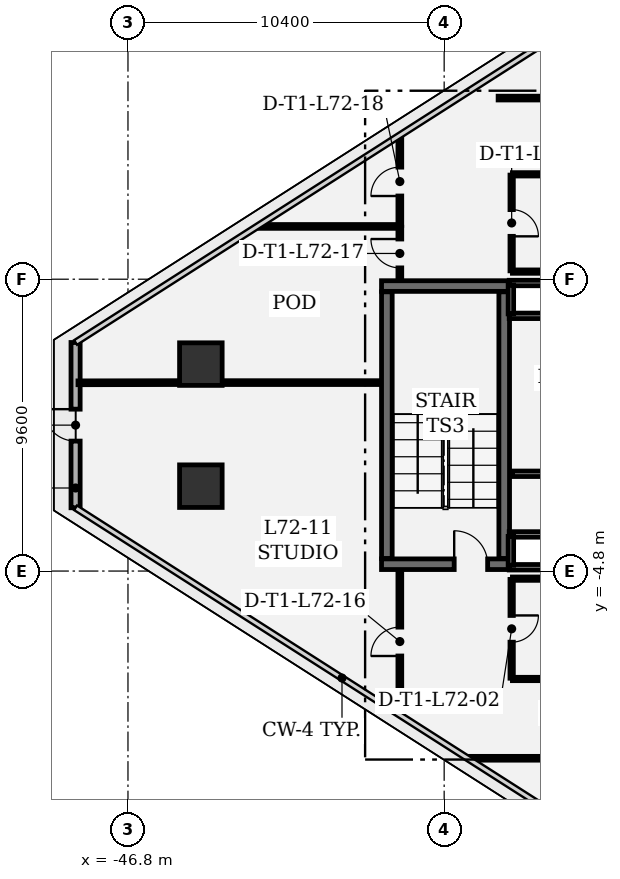
"""IFC4 building model, lengths in metres.
Left out: names, types, materials, properties, quantities, classifications, styles, units other than length and angle.
Written with IfcOpenShell. Run it as: python <this file> out.ifc"""

import sys

from ifc_helpers import new_model, si_unit, direction, frame, frame_2d, origin, origin_2d, place, context, subcontext, project, spatial, rectangle, extrude, element, fill, save


model = new_model("IFC4")
c1 = context("Model", 3, precision=1e-05, world=origin(), true_north=direction((0.0, 1.0)))
c2 = subcontext(c1, "Body", "Model", "MODEL_VIEW")
j1 = project(units=[si_unit("LENGTHUNIT", "METRE"), si_unit("PLANEANGLEUNIT", "RADIAN")], contexts=[c1])
p1 = place(None, origin())
s1 = spatial("IfcSite", under=j1, at=p1, CompositionType="ELEMENT")
p2 = place(p1, origin())
s2 = spatial("IfcBuilding", under=s1, at=p2, CompositionType="ELEMENT")
p3 = place(p2, frame((0.0, 0.0, 310.2)))
s3 = spatial("IfcBuildingStorey", under=s2, at=p3, CompositionType="ELEMENT", Elevation=310.2)
for number, where, z_axis, x_axis in (
    (1, (-44.403, 2.008, 0.0), (0.0, 0.0, 1.0), (1.0, 0.0, 0.0)),
    (2, (-44.403, -2.008, 0.0), (0.0, 0.0, 1.0), (1.0, 0.0, 0.0)),
):
    element("IfcColumn", number, at=place(p3, frame(where, z_axis=z_axis, x_axis=x_axis)), inside=s3, PredefinedType="COLUMN", context=c2, shape_type="SweptSolid", body=[
        extrude(rectangle(XDim=1.4, YDim=1.4, at=origin_2d()), origin(), (0.0, 0.0, 1.0), 4.2),
    ])
p4 = place(p3, frame((-48.523, -2.718, 0.0), z_axis=(0.0, 0.0, 1.0), x_axis=(0.0, 1.0, 0.0)))
e3 = element("IfcWall", 3, at=p4, inside=s3, PredefinedType="SOLIDWALL", context=c2, shape_type="SweptSolid", body=[
    extrude(rectangle(XDim=5.437, YDim=0.3, at=frame_2d((2.718, 0.0))), origin(), (0.0, 0.0, 1.0), 3.91),
])
p5 = place(p4, frame((2.193, 0.0, 0.0)))
e4 = element("IfcOpeningElement", 4, at=p5, cuts=e3, PredefinedType="OPENING", context=c2, shape_type="SweptSolid", body=[
    extrude(rectangle(XDim=1.05, YDim=2.2, at=frame_2d((0.525, 1.1))), frame((0.0, 0.16, 0.0), z_axis=(0.0, -1.0, 0.0), x_axis=(1.0, 0.0, 0.0)), (0.0, 0.0, 1.0), 0.32),
])
p6 = place(p3, frame((-38.46, -4.575, 0.0), z_axis=(0.0, 0.0, 1.0), x_axis=(1.0, 0.0, 0.0)))
e5 = element("IfcWall", 5, at=p6, inside=s3, PredefinedType="SHEAR", context=c2, shape_type="SweptSolid", body=[
    extrude(rectangle(XDim=4.21, YDim=0.35, at=frame_2d((2.105, 0.0))), origin(), (0.0, 0.0, 1.0), 3.91),
])
p7 = place(p6, frame((2.39, 0.0, 0.0)))
e6 = element("IfcOpeningElement", 6, at=p7, cuts=e5, PredefinedType="OPENING", context=c2, shape_type="SweptSolid", body=[
    extrude(rectangle(XDim=1.1, YDim=2.2, at=frame_2d((0.55, 1.1))), frame((0.0, 0.185, 0.0), z_axis=(0.0, -1.0, 0.0), x_axis=(1.0, 0.0, 0.0)), (0.0, 0.0, 1.0), 0.37),
])
p8 = place(p3, frame((-34.25, 4.575, 0.0), z_axis=(0.0, 0.0, 1.0), x_axis=(-1.0, 0.0, 0.0)))
e7 = element("IfcWall", 7, at=p8, inside=s3, PredefinedType="SHEAR", context=c2, shape_type="SweptSolid", body=[
    extrude(rectangle(XDim=4.21, YDim=0.35, at=frame_2d((2.105, 0.0))), origin(), (0.0, 0.0, 1.0), 3.91),
])
for number, where, z_axis, x_axis in (
    (8, (-34.425, -4.385, 0.0), (0.0, 0.0, 1.0), (0.0, 1.0, 0.0)),
    (9, (-38.285, 4.385, 0.0), (0.0, 0.0, 1.0), (0.0, -1.0, 0.0)),
):
    element("IfcWall", number, at=place(p3, frame(where, z_axis=z_axis, x_axis=x_axis)), inside=s3, PredefinedType="SHEAR", context=c2, shape_type="SweptSolid", body=[
        extrude(rectangle(XDim=8.77, YDim=0.35, at=frame_2d((4.385, 0.0))), origin(), (0.0, 0.0, 1.0), 3.91),
    ])
for number, where, z_axis, x_axis in (
    (10, (-32.99, 3.595, 0.0), (0.0, 0.0, 1.0), (-1.0, 0.0, 0.0)),
    (11, (-34.26, 4.675, 0.0), (0.0, 0.0, 1.0), (1.0, 0.0, 0.0)),
):
    element("IfcWall", number, at=place(p3, frame(where, z_axis=z_axis, x_axis=x_axis)), inside=s3, PredefinedType="PARTITIONING", context=c2, shape_type="SweptSolid", body=[
        extrude(rectangle(XDim=1.27, YDim=0.18, at=frame_2d((0.635, 0.0))), origin(), (0.0, 0.0, 1.0), 3.91),
    ])
p9 = place(p3, frame((-34.205, 3.66, 0.0), z_axis=(0.0, 0.0, 1.0), x_axis=(0.0, 1.0, 0.0)))
e12 = element("IfcWall", 12, at=p9, inside=s3, PredefinedType="PARTITIONING", context=c2, shape_type="SweptSolid", body=[
    extrude(rectangle(XDim=0.95, YDim=0.18, at=frame_2d((0.475, 0.0))), origin(), (0.0, 0.0, 1.0), 3.91),
])
for number, where, z_axis, x_axis in (
    (13, (-32.99, -4.675, 0.0), (0.0, 0.0, 1.0), (-1.0, 0.0, 0.0)),
    (14, (-34.26, -3.595, 0.0), (0.0, 0.0, 1.0), (1.0, 0.0, 0.0)),
):
    element("IfcWall", number, at=place(p3, frame(where, z_axis=z_axis, x_axis=x_axis)), inside=s3, PredefinedType="PARTITIONING", context=c2, shape_type="SweptSolid", body=[
        extrude(rectangle(XDim=1.27, YDim=0.18, at=frame_2d((0.635, 0.0))), origin(), (0.0, 0.0, 1.0), 3.91),
    ])
p10 = place(p3, frame((-34.205, -4.61, 0.0), z_axis=(0.0, 0.0, 1.0), x_axis=(0.0, 1.0, 0.0)))
e15 = element("IfcWall", 15, at=p10, inside=s3, PredefinedType="PARTITIONING", context=c2, shape_type="SweptSolid", body=[
    extrude(rectangle(XDim=0.95, YDim=0.18, at=frame_2d((0.475, 0.0))), origin(), (0.0, 0.0, 1.0), 3.91),
])
p11 = place(p3, frame((-34.18, 8.225, 0.0), z_axis=(0.0, 0.0, 1.0), x_axis=(0.0, -1.0, 0.0)))
e16 = element("IfcWall", 16, at=p11, inside=s3, PredefinedType="PARTITIONING", context=c2, shape_type="SweptSolid", body=[
    extrude(rectangle(XDim=3.15, YDim=0.11, at=frame_2d((1.575, 0.0))), origin(), (0.0, 0.0, 1.0), 3.91),
])
p12 = place(p11, frame((1.135, 0.0, 0.0)))
e17 = element("IfcOpeningElement", 17, at=p12, cuts=e16, PredefinedType="OPENING", context=c2, shape_type="SweptSolid", body=[
    extrude(rectangle(XDim=0.88, YDim=2.1, at=frame_2d((0.44, 1.05))), frame((0.0, 0.065, 0.0), z_axis=(0.0, -1.0, 0.0), x_axis=(1.0, 0.0, 0.0)), (0.0, 0.0, 1.0), 0.13),
])
p13 = place(p3, frame((-34.155, 5.05, 0.0), z_axis=(0.0, 0.0, 1.0), x_axis=(1.0, 0.0, 0.0)))
e18 = element("IfcWall", 18, at=p13, inside=s3, PredefinedType="PARTITIONING", context=c2, shape_type="SweptSolid", body=[
    extrude(rectangle(XDim=3.19, YDim=0.11, at=frame_2d((1.595, 0.0))), origin(), (0.0, 0.0, 1.0), 3.91),
])
for number, where, z_axis, x_axis in (
    (19, (-30.905, 8.25, 0.0), (0.0, 0.0, 1.0), (-1.0, 0.0, 0.0)),
    (20, (-34.155, -8.35, 0.0), (0.0, 0.0, 1.0), (1.0, 0.0, 0.0)),
):
    element("IfcWall", number, at=place(p3, frame(where, z_axis=z_axis, x_axis=x_axis)), inside=s3, PredefinedType="PARTITIONING", context=c2, shape_type="SweptSolid", body=[
        extrude(rectangle(XDim=3.25, YDim=0.11, at=frame_2d((1.625, 0.0))), origin(), (0.0, 0.0, 1.0), 3.13),
    ])
p14 = place(p3, frame((-30.965, -5.05, 0.0), z_axis=(0.0, 0.0, 1.0), x_axis=(-1.0, 0.0, 0.0)))
e21 = element("IfcWall", 21, at=p14, inside=s3, PredefinedType="PARTITIONING", context=c2, shape_type="SweptSolid", body=[
    extrude(rectangle(XDim=3.19, YDim=0.11, at=frame_2d((1.595, 0.0))), origin(), (0.0, 0.0, 1.0), 3.91),
])
p15 = place(p3, frame((-34.18, -5.075, 0.0), z_axis=(0.0, 0.0, 1.0), x_axis=(0.0, -1.0, 0.0)))
e22 = element("IfcWall", 22, at=p15, inside=s3, PredefinedType="PARTITIONING", context=c2, shape_type="SweptSolid", body=[
    extrude(rectangle(XDim=3.25, YDim=0.11, at=frame_2d((1.625, 0.0))), origin(), (0.0, 0.0, 1.0), 3.91),
])
p16 = place(p15, frame((1.185, 0.0, 0.0)))
e23 = element("IfcOpeningElement", 23, at=p16, cuts=e22, PredefinedType="OPENING", context=c2, shape_type="SweptSolid", body=[
    extrude(rectangle(XDim=0.88, YDim=2.1, at=frame_2d((0.44, 1.05))), frame((0.0, 0.065, 0.0), z_axis=(0.0, -1.0, 0.0), x_axis=(1.0, 0.0, 0.0)), (0.0, 0.0, 1.0), 0.13),
])
p17 = place(p3, frame((-30.905, -1.6, 0.0), z_axis=(0.0, 0.0, 1.0), x_axis=(-1.0, 0.0, 0.0)))
e24 = element("IfcWall", 24, at=p17, inside=s3, PredefinedType="PARTITIONING", context=c2, shape_type="SweptSolid", body=[
    extrude(rectangle(XDim=3.25, YDim=0.18, at=frame_2d((1.625, 0.0))), origin(), (0.0, 0.0, 1.0), 3.91),
])
p18 = place(p17, frame((1.185, 0.0, 0.0)))
e25 = element("IfcOpeningElement", 25, at=p18, cuts=e24, PredefinedType="OPENING", context=c2, shape_type="SweptSolid", body=[
    extrude(rectangle(XDim=0.88, YDim=2.1, at=frame_2d((0.44, 1.05))), frame((0.0, 0.1, 0.0), z_axis=(0.0, -1.0, 0.0), x_axis=(1.0, 0.0, 0.0)), (0.0, 0.0, 1.0), 0.2),
])
p19 = place(p3, frame((-34.625, 10.758, 0.0), z_axis=(0.0, 0.0, 1.0), x_axis=(1.0, 0.0, 0.0)))
e26 = element("IfcWall", 26, at=p19, inside=s3, PredefinedType="PARTITIONING", context=c2, shape_type="SweptSolid", body=[
    extrude(rectangle(XDim=6.498, YDim=0.125, at=frame_2d((3.249, 0.0))), origin(), (0.0, 0.0, 1.0), 3.13),
])
p20 = place(p19, frame((2.774, 0.0, 0.0)))
e27 = element("IfcOpeningElement", 27, at=p20, cuts=e26, PredefinedType="OPENING", context=c2, shape_type="SweptSolid", body=[
    extrude(rectangle(XDim=0.95, YDim=2.15, at=frame_2d((0.475, 1.075))), frame((0.0, 0.073, 0.0), z_axis=(0.0, -1.0, 0.0), x_axis=(1.0, 0.0, 0.0)), (0.0, 0.0, 1.0), 0.145),
])
p21 = place(p3, frame((-26.89, -10.958, 0.0), z_axis=(0.0, 0.0, 1.0), x_axis=(-1.0, 0.0, 0.0)))
e28 = element("IfcWall", 28, at=p21, inside=s3, PredefinedType="PARTITIONING", context=c2, shape_type="SweptSolid", body=[
    extrude(rectangle(XDim=8.661, YDim=0.125, at=frame_2d((4.331, 0.0))), origin(), (0.0, 0.0, 1.0), 3.13),
])
p22 = place(p21, frame((3.856, 0.0, 0.0)))
e29 = element("IfcOpeningElement", 29, at=p22, cuts=e28, PredefinedType="OPENING", context=c2, shape_type="SweptSolid", body=[
    extrude(rectangle(XDim=0.95, YDim=2.15, at=frame_2d((0.475, 1.075))), frame((0.0, 0.073, 0.0), z_axis=(0.0, -1.0, 0.0), x_axis=(1.0, 0.0, 0.0)), (0.0, 0.0, 1.0), 0.145),
])
p23 = place(p3, frame((-37.858, -9.455, 0.0), z_axis=(0.0, 0.0, 1.0), x_axis=(0.0, 1.0, 0.0)))
e30 = element("IfcWall", 30, at=p23, inside=s3, PredefinedType="PARTITIONING", context=c2, shape_type="SweptSolid", body=[
    extrude(rectangle(XDim=4.672, YDim=0.125, at=frame_2d((2.336, 0.0))), origin(), (0.0, 0.0, 1.0), 3.91),
])
p24 = place(p23, frame((1.861, 0.0, 0.0)))
e31 = element("IfcOpeningElement", 31, at=p24, cuts=e30, PredefinedType="OPENING", context=c2, shape_type="SweptSolid", body=[
    extrude(rectangle(XDim=0.95, YDim=2.15, at=frame_2d((0.475, 1.075))), frame((0.0, 0.073, 0.0), z_axis=(0.0, -1.0, 0.0), x_axis=(1.0, 0.0, 0.0)), (0.0, 0.0, 1.0), 0.145),
])
p25 = place(p3, frame((-38.493, 1.399, 0.0), z_axis=(0.0, 0.0, 1.0), x_axis=(-1.0, 0.0, 0.0)))
e32 = element("IfcWall", 32, at=p25, inside=s3, PredefinedType="PARTITIONING", context=c2, shape_type="SweptSolid", body=[
    extrude(rectangle(XDim=5.145, YDim=0.125, at=frame_2d((2.572, 0.0))), origin(), (0.0, 0.0, 1.0), 3.91),
])
p26 = place(p3, frame((-45.167, 1.399, 0.0), z_axis=(0.0, 0.0, 1.0), x_axis=(-0.999998122673, -0.001937691995, 0.0)))
e33 = element("IfcWall", 33, at=p26, inside=s3, PredefinedType="PARTITIONING", context=c2, shape_type="SweptSolid", body=[
    extrude(rectangle(XDim=3.276, YDim=0.125, at=frame_2d((1.638, 0.0))), origin(), (0.0, 0.0, 1.0), 3.91),
])
p27 = place(p3, frame((-37.858, 4.783, 0.0), z_axis=(0.0, 0.0, 1.0), x_axis=(0.0, 1.0, 0.0)))
e34 = element("IfcWall", 34, at=p27, inside=s3, PredefinedType="PARTITIONING", context=c2, shape_type="SweptSolid", body=[
    extrude(rectangle(XDim=1.728, YDim=0.125, at=frame_2d((0.864, 0.0))), origin(), (0.0, 0.0, 1.0), 3.91),
])
p28 = place(p27, frame((0.389, 0.0, 0.0)))
e35 = element("IfcOpeningElement", 35, at=p28, cuts=e34, PredefinedType="OPENING", context=c2, shape_type="SweptSolid", body=[
    extrude(rectangle(XDim=0.95, YDim=2.15, at=frame_2d((0.475, 1.075))), frame((0.0, 0.073, 0.0), z_axis=(0.0, -1.0, 0.0), x_axis=(1.0, 0.0, 0.0)), (0.0, 0.0, 1.0), 0.145),
])
p29 = place(p3, frame((-37.883, 6.536, 0.0), z_axis=(0.0, 0.0, 1.0), x_axis=(-1.0, 0.0, 0.0)))
e36 = element("IfcWall", 36, at=p29, inside=s3, PredefinedType="PARTITIONING", context=c2, shape_type="SweptSolid", body=[
    extrude(rectangle(XDim=4.587, YDim=0.125, at=frame_2d((2.294, 0.0))), origin(), (0.0, 0.0, 1.0), 3.91),
])
p30 = place(p3, frame((-37.858, 6.569, 0.0), z_axis=(0.0, 0.0, 1.0), x_axis=(0.0, 1.0, 0.0)))
e37 = element("IfcWall", 37, at=p30, inside=s3, PredefinedType="PARTITIONING", context=c2, shape_type="SweptSolid", body=[
    extrude(rectangle(XDim=2.886, YDim=0.125, at=frame_2d((1.443, 0.0))), origin(), (0.0, 0.0, 1.0), 3.91),
])
p31 = place(p30, frame((0.968, 0.0, 0.0)))
e38 = element("IfcOpeningElement", 38, at=p31, cuts=e37, PredefinedType="OPENING", context=c2, shape_type="SweptSolid", body=[
    extrude(rectangle(XDim=0.95, YDim=2.15, at=frame_2d((0.475, 1.075))), frame((0.0, 0.073, 0.0), z_axis=(0.0, -1.0, 0.0), x_axis=(1.0, 0.0, 0.0)), (0.0, 0.0, 1.0), 0.145),
])
p32 = place(p5, origin())
e39 = element("IfcDoor", 39, at=p32, inside=s3, OperationType="SINGLE_SWING_RIGHT", PredefinedType="DOOR", context=c2, shape_type="SweptSolid", body=[
    extrude(rectangle(XDim=1.05, YDim=2.2, at=frame_2d((0.525, 1.1))), frame((0.0, 0.025, 0.0), z_axis=(0.0, -1.0, 0.0), x_axis=(1.0, 0.0, 0.0)), (0.0, 0.0, 1.0), 0.05),
])
fill(e4, e39)
p33 = place(p7, origin())
e40 = element("IfcDoor", 40, at=p33, inside=s3, OperationType="SINGLE_SWING_LEFT", PredefinedType="DOOR", context=c2, shape_type="SweptSolid", body=[
    extrude(rectangle(XDim=1.1, YDim=2.2, at=frame_2d((0.55, 1.1))), frame((0.0, 0.025, 0.0), z_axis=(0.0, -1.0, 0.0), x_axis=(1.0, 0.0, 0.0)), (0.0, 0.0, 1.0), 0.05),
])
fill(e6, e40)
p34 = place(p12, origin())
e41 = element("IfcDoor", 41, at=p34, inside=s3, OperationType="SINGLE_SWING_RIGHT", PredefinedType="DOOR", context=c2, shape_type="SweptSolid", body=[
    extrude(rectangle(XDim=0.88, YDim=2.1, at=frame_2d((0.44, 1.05))), frame((0.0, 0.025, 0.0), z_axis=(0.0, -1.0, 0.0), x_axis=(1.0, 0.0, 0.0)), (0.0, 0.0, 1.0), 0.05),
])
fill(e17, e41)
p35 = place(p16, origin())
e42 = element("IfcDoor", 42, at=p35, inside=s3, OperationType="SINGLE_SWING_LEFT", PredefinedType="DOOR", context=c2, shape_type="SweptSolid", body=[
    extrude(rectangle(XDim=0.88, YDim=2.1, at=frame_2d((0.44, 1.05))), frame((0.0, 0.025, 0.0), z_axis=(0.0, -1.0, 0.0), x_axis=(1.0, 0.0, 0.0)), (0.0, 0.0, 1.0), 0.05),
])
fill(e23, e42)
p36 = place(p24, origin())
e43 = element("IfcDoor", 43, at=p36, inside=s3, OperationType="SINGLE_SWING_LEFT", PredefinedType="DOOR", context=c2, shape_type="SweptSolid", body=[
    extrude(rectangle(XDim=0.95, YDim=2.15, at=frame_2d((0.475, 1.075))), frame((0.0, 0.025, 0.0), z_axis=(0.0, -1.0, 0.0), x_axis=(1.0, 0.0, 0.0)), (0.0, 0.0, 1.0), 0.05),
])
fill(e31, e43)
p37 = place(p28, origin())
e44 = element("IfcDoor", 44, at=p37, inside=s3, OperationType="SINGLE_SWING_RIGHT", PredefinedType="DOOR", context=c2, shape_type="SweptSolid", body=[
    extrude(rectangle(XDim=0.95, YDim=2.15, at=frame_2d((0.475, 1.075))), frame((0.0, 0.025, 0.0), z_axis=(0.0, -1.0, 0.0), x_axis=(1.0, 0.0, 0.0)), (0.0, 0.0, 1.0), 0.05),
])
fill(e35, e44)
p38 = place(p31, origin())
e45 = element("IfcDoor", 45, at=p38, inside=s3, OperationType="SINGLE_SWING_LEFT", PredefinedType="DOOR", context=c2, shape_type="SweptSolid", body=[
    extrude(rectangle(XDim=0.95, YDim=2.15, at=frame_2d((0.475, 1.075))), frame((0.0, 0.025, 0.0), z_axis=(0.0, -1.0, 0.0), x_axis=(1.0, 0.0, 0.0)), (0.0, 0.0, 1.0), 0.05),
])
fill(e38, e45)
save(model, sys.argv[1])
